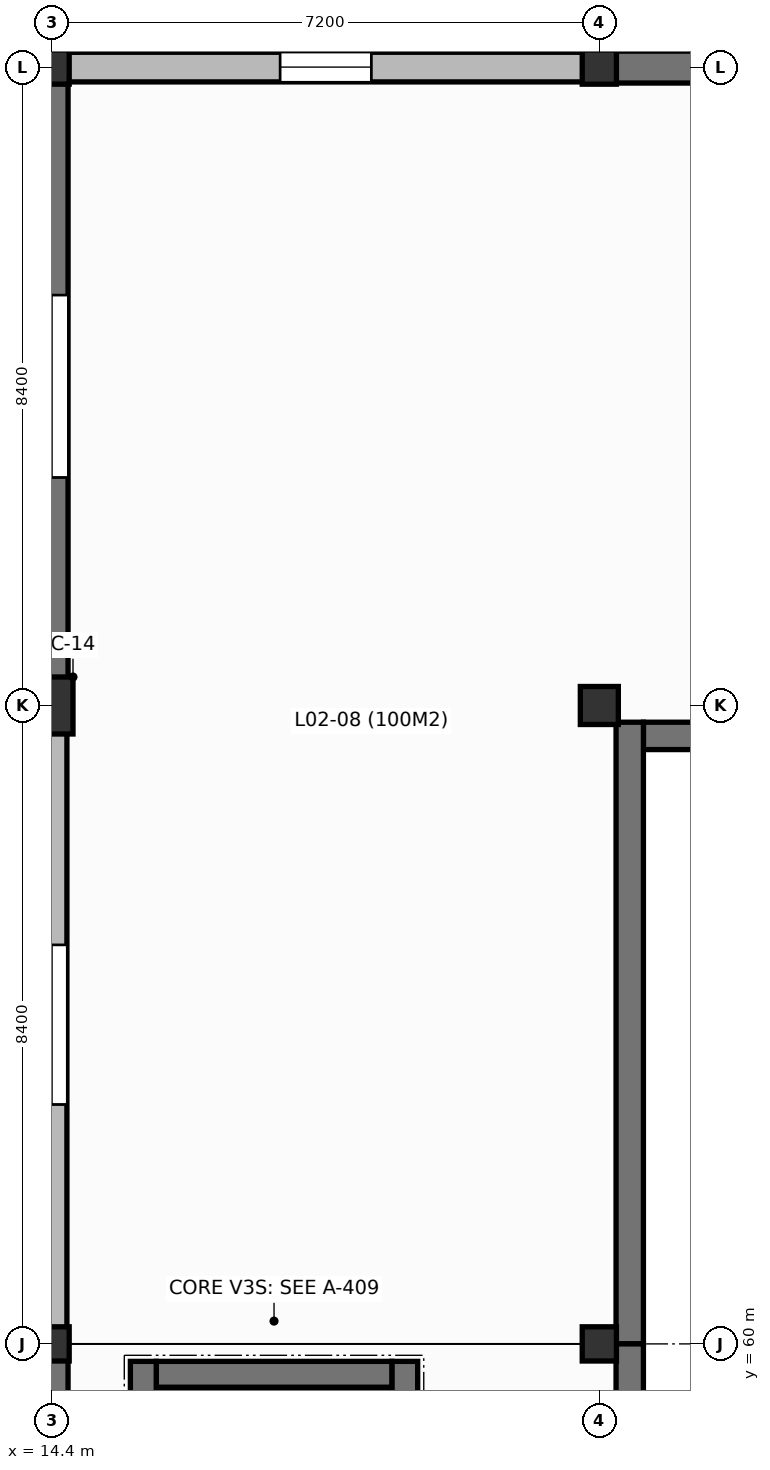
"""IFC4 building model, lengths in metres.
Left out: names, types, materials, properties, quantities, classifications, styles, units other than length and angle.
Written with IfcOpenShell. Run it as: python <this file> out.ifc"""

import sys

from ifc_helpers import new_model, si_unit, direction, frame, frame_2d, origin, origin_2d, place, context, subcontext, project, spatial, rectangle, extrude, element, fill, save


model = new_model("IFC4")
c1 = context("Model", 3, precision=1e-05, world=origin(), true_north=direction((0.0, 1.0)))
c2 = subcontext(c1, "Body", "Model", "MODEL_VIEW")
j1 = project(units=[si_unit("LENGTHUNIT", "METRE"), si_unit("PLANEANGLEUNIT", "RADIAN")], contexts=[c1])
p1 = place(None, origin())
s1 = spatial("IfcSite", under=j1, at=p1, CompositionType="ELEMENT")
p2 = place(p1, origin())
s2 = spatial("IfcBuilding", under=s1, at=p2, CompositionType="ELEMENT")
p3 = place(p2, frame((0.0, 0.0, 9.0)))
s3 = spatial("IfcBuildingStorey", under=s2, at=p3, CompositionType="ELEMENT", Elevation=9.0)
p4 = place(p3, frame((14.4, 60.0, 0.0), z_axis=(0.0, 0.0, 1.0), x_axis=(1.0, 0.0, 0.0)))
e1 = element("IfcColumn", 1, at=p4, inside=s3, PredefinedType="COLUMN", context=c2, shape_type="SweptSolid", body=[
    extrude(rectangle(XDim=0.45, YDim=0.45, at=origin_2d()), origin(), (0.0, 0.0, 1.0), 4.2),
])
p5 = place(p3, frame((14.4, 68.4, 0.0), z_axis=(0.0, 0.0, 1.0), x_axis=(1.0, 0.0, 0.0)))
e2 = element("IfcColumn", 2, at=p5, inside=s3, PredefinedType="COLUMN", context=c2, shape_type="SweptSolid", body=[
    extrude(rectangle(XDim=0.55, YDim=0.75, at=origin_2d()), origin(), (0.0, 0.0, 1.0), 4.2),
])
for number, where, z_axis, x_axis in (
    (3, (14.4, 76.8, 0.0), (0.0, 0.0, 1.0), (1.0, 0.0, 0.0)),
    (4, (21.6, 60.0, 0.0), (0.0, 0.0, 1.0), (1.0, 0.0, 0.0)),
):
    element("IfcColumn", number, at=place(p3, frame(where, z_axis=z_axis, x_axis=x_axis)), inside=s3, PredefinedType="COLUMN", context=c2, shape_type="SweptSolid", body=[
        extrude(rectangle(XDim=0.45, YDim=0.45, at=origin_2d()), origin(), (0.0, 0.0, 1.0), 4.2),
    ])
p6 = place(p3, frame((21.6, 68.4, 0.0), z_axis=(0.0, 0.0, 1.0), x_axis=(1.0, 0.0, 0.0)))
e5 = element("IfcColumn", 5, at=p6, inside=s3, PredefinedType="COLUMN", context=c2, shape_type="SweptSolid", body=[
    extrude(rectangle(XDim=0.5, YDim=0.5, at=origin_2d()), origin(), (0.0, 0.0, 1.0), 4.2),
])
p7 = place(p3, frame((21.6, 76.8, 0.0), z_axis=(0.0, 0.0, 1.0), x_axis=(1.0, 0.0, 0.0)))
e6 = element("IfcColumn", 6, at=p7, inside=s3, PredefinedType="COLUMN", context=c2, shape_type="SweptSolid", body=[
    extrude(rectangle(XDim=0.45, YDim=0.45, at=origin_2d()), origin(), (0.0, 0.0, 1.0), 4.2),
])
p8 = place(p3, frame((14.4, 51.6, 0.0), z_axis=(0.0, 0.0, 1.0), x_axis=(0.0, 1.0, 0.0)))
e7 = element("IfcWall", 7, at=p8, inside=s3, PredefinedType="STANDARD", context=c2, shape_type="SweptSolid", body=[
    extrude(rectangle(XDim=8.4, YDim=0.42, at=frame_2d((4.2, 0.0))), origin(), (0.0, 0.0, 1.0), 3.84),
])
p9 = place(p3, frame((14.4, 60.0, 0.0), z_axis=(0.0, 0.0, 1.0), x_axis=(0.0, 1.0, 0.0)))
e8 = element("IfcWall", 8, at=p9, inside=s3, PredefinedType="STANDARD", context=c2, shape_type="SweptSolid", body=[
    extrude(rectangle(XDim=8.4, YDim=0.39, at=frame_2d((4.2, 0.0))), origin(), (0.0, 0.0, 1.0), 2.99),
])
p10 = place(p9, frame((3.15, 0.0, 0.8)))
e9 = element("IfcOpeningElement", 9, at=p10, cuts=e8, PredefinedType="OPENING", context=c2, shape_type="SweptSolid", body=[
    extrude(rectangle(XDim=2.1, YDim=1.65, at=frame_2d((1.05, 0.825))), frame((0.0, 0.205, 0.0), z_axis=(0.0, -1.0, 0.0), x_axis=(1.0, 0.0, 0.0)), (0.0, 0.0, 1.0), 0.41),
])
p11 = place(p3, frame((14.4, 68.4, 0.0), z_axis=(0.0, 0.0, 1.0), x_axis=(0.0, 1.0, 0.0)))
e10 = element("IfcWall", 10, at=p11, inside=s3, PredefinedType="STANDARD", context=c2, shape_type="SweptSolid", body=[
    extrude(rectangle(XDim=8.4, YDim=0.42, at=frame_2d((4.2, 0.0))), origin(), (0.0, 0.0, 1.0), 3.84),
])
p12 = place(p11, frame((3.0, 0.0, 0.8)))
e11 = element("IfcOpeningElement", 11, at=p12, cuts=e10, PredefinedType="OPENING", context=c2, shape_type="SweptSolid", body=[
    extrude(rectangle(XDim=2.4, YDim=1.65, at=frame_2d((1.2, 0.825))), frame((0.0, 0.22, 0.0), z_axis=(0.0, -1.0, 0.0), x_axis=(1.0, 0.0, 0.0)), (0.0, 0.0, 1.0), 0.44),
])
p13 = place(p3, frame((14.4, 76.8, 0.0), z_axis=(0.0, 0.0, 1.0), x_axis=(1.0, 0.0, 0.0)))
e12 = element("IfcWall", 12, at=p13, inside=s3, PredefinedType="STANDARD", context=c2, shape_type="SweptSolid", body=[
    extrude(rectangle(XDim=7.2, YDim=0.39, at=frame_2d((3.6, 0.0))), origin(), (0.0, 0.0, 1.0), 3.04),
])
p14 = place(p13, frame((3.0, 0.0, 0.8)))
e13 = element("IfcOpeningElement", 13, at=p14, cuts=e12, PredefinedType="OPENING", context=c2, shape_type="SweptSolid", body=[
    extrude(rectangle(XDim=1.2, YDim=1.45, at=frame_2d((0.6, 0.725))), frame((0.0, 0.205, 0.0), z_axis=(0.0, -1.0, 0.0), x_axis=(1.0, 0.0, 0.0)), (0.0, 0.0, 1.0), 0.41),
])
p15 = place(p3, frame((21.6, 76.8, 0.0), z_axis=(0.0, 0.0, 1.0), x_axis=(1.0, 0.0, 0.0)))
e14 = element("IfcWall", 14, at=p15, inside=s3, PredefinedType="STANDARD", context=c2, shape_type="SweptSolid", body=[
    extrude(rectangle(XDim=7.2, YDim=0.42, at=frame_2d((3.6, 0.0))), origin(), (0.0, 0.0, 1.0), 3.84),
])
p16 = place(p15, frame((2.85, 0.0, 0.8)))
e15 = element("IfcOpeningElement", 15, at=p16, cuts=e14, PredefinedType="OPENING", context=c2, shape_type="SweptSolid", body=[
    extrude(rectangle(XDim=1.5, YDim=1.45, at=frame_2d((0.75, 0.725))), frame((0.0, 0.22, 0.0), z_axis=(0.0, -1.0, 0.0), x_axis=(1.0, 0.0, 0.0)), (0.0, 0.0, 1.0), 0.44),
])
p17 = place(p3, frame((19.04, 51.83, 0.0), z_axis=(0.0, 0.0, 1.0), x_axis=(0.0, 1.0, 0.0)))
e16 = element("IfcWall", 16, at=p17, inside=s3, PredefinedType="SHEAR", context=c2, shape_type="SweptSolid", body=[
    extrude(rectangle(XDim=7.94, YDim=0.34, at=frame_2d((3.97, 0.0))), origin(), (0.0, 0.0, 1.0), 4.2),
])
p18 = place(p3, frame((18.87, 59.6, 0.0), z_axis=(0.0, 0.0, 1.0), x_axis=(-1.0, 0.0, 0.0)))
e17 = element("IfcWall", 17, at=p18, inside=s3, PredefinedType="SHEAR", context=c2, shape_type="SweptSolid", body=[
    extrude(rectangle(XDim=3.1, YDim=0.34, at=frame_2d((1.55, 0.0))), origin(), (0.0, 0.0, 1.0), 4.2),
])
p19 = place(p3, frame((15.6, 59.77, 0.0), z_axis=(0.0, 0.0, 1.0), x_axis=(0.0, -1.0, 0.0)))
e18 = element("IfcWall", 18, at=p19, inside=s3, PredefinedType="SHEAR", context=c2, shape_type="SweptSolid", body=[
    extrude(rectangle(XDim=7.94, YDim=0.34, at=frame_2d((3.97, 0.0))), origin(), (0.0, 0.0, 1.0), 4.2),
])
p20 = place(p3, frame((32.4, 68.0, 0.0), z_axis=(0.0, 0.0, 1.0), x_axis=(-1.0, 0.0, 0.0)))
e19 = element("IfcWall", 19, at=p20, inside=s3, PredefinedType="SHEAR", context=c2, shape_type="SweptSolid", body=[
    extrude(rectangle(XDim=10.22, YDim=0.36, at=frame_2d((5.11, 0.0))), origin(), (0.0, 0.0, 1.0), 4.2),
])
for number, where, z_axis, x_axis in (
    (20, (22.0, 68.18, 0.0), (0.0, 0.0, 1.0), (0.0, -1.0, 0.0)),
    (21, (22.0, 60.0, 0.0), (0.0, 0.0, 1.0), (0.0, -1.0, 0.0)),
):
    element("IfcWall", number, at=place(p3, frame(where, z_axis=z_axis, x_axis=x_axis)), inside=s3, PredefinedType="SHEAR", context=c2, shape_type="SweptSolid", body=[
        extrude(rectangle(XDim=8.18, YDim=0.36, at=frame_2d((4.09, 0.0))), origin(), (0.0, 0.0, 1.0), 4.2),
    ])
p21 = place(p10, origin())
e22 = element("IfcWindow", 22, at=p21, inside=s3, PartitioningType="SINGLE_PANEL", PredefinedType="WINDOW", context=c2, shape_type="SweptSolid", body=[
    extrude(rectangle(XDim=2.1, YDim=1.65, at=frame_2d((1.05, 0.825))), frame((0.0, 0.03, 0.0), z_axis=(0.0, -1.0, 0.0), x_axis=(1.0, 0.0, 0.0)), (0.0, 0.0, 1.0), 0.06),
])
fill(e9, e22)
p22 = place(p12, origin())
e23 = element("IfcWindow", 23, at=p22, inside=s3, PartitioningType="TRIPLE_PANEL_VERTICAL", PredefinedType="WINDOW", context=c2, shape_type="SweptSolid", body=[
    extrude(rectangle(XDim=2.4, YDim=1.65, at=frame_2d((1.2, 0.825))), frame((0.0, 0.03, 0.0), z_axis=(0.0, -1.0, 0.0), x_axis=(1.0, 0.0, 0.0)), (0.0, 0.0, 1.0), 0.06),
])
fill(e11, e23)
p23 = place(p14, origin())
e24 = element("IfcWindow", 24, at=p23, inside=s3, PartitioningType="SINGLE_PANEL", PredefinedType="WINDOW", context=c2, shape_type="SweptSolid", body=[
    extrude(rectangle(XDim=1.2, YDim=1.45, at=frame_2d((0.6, 0.725))), frame((0.0, 0.03, 0.0), z_axis=(0.0, -1.0, 0.0), x_axis=(1.0, 0.0, 0.0)), (0.0, 0.0, 1.0), 0.06),
])
fill(e13, e24)
save(model, sys.argv[1])
